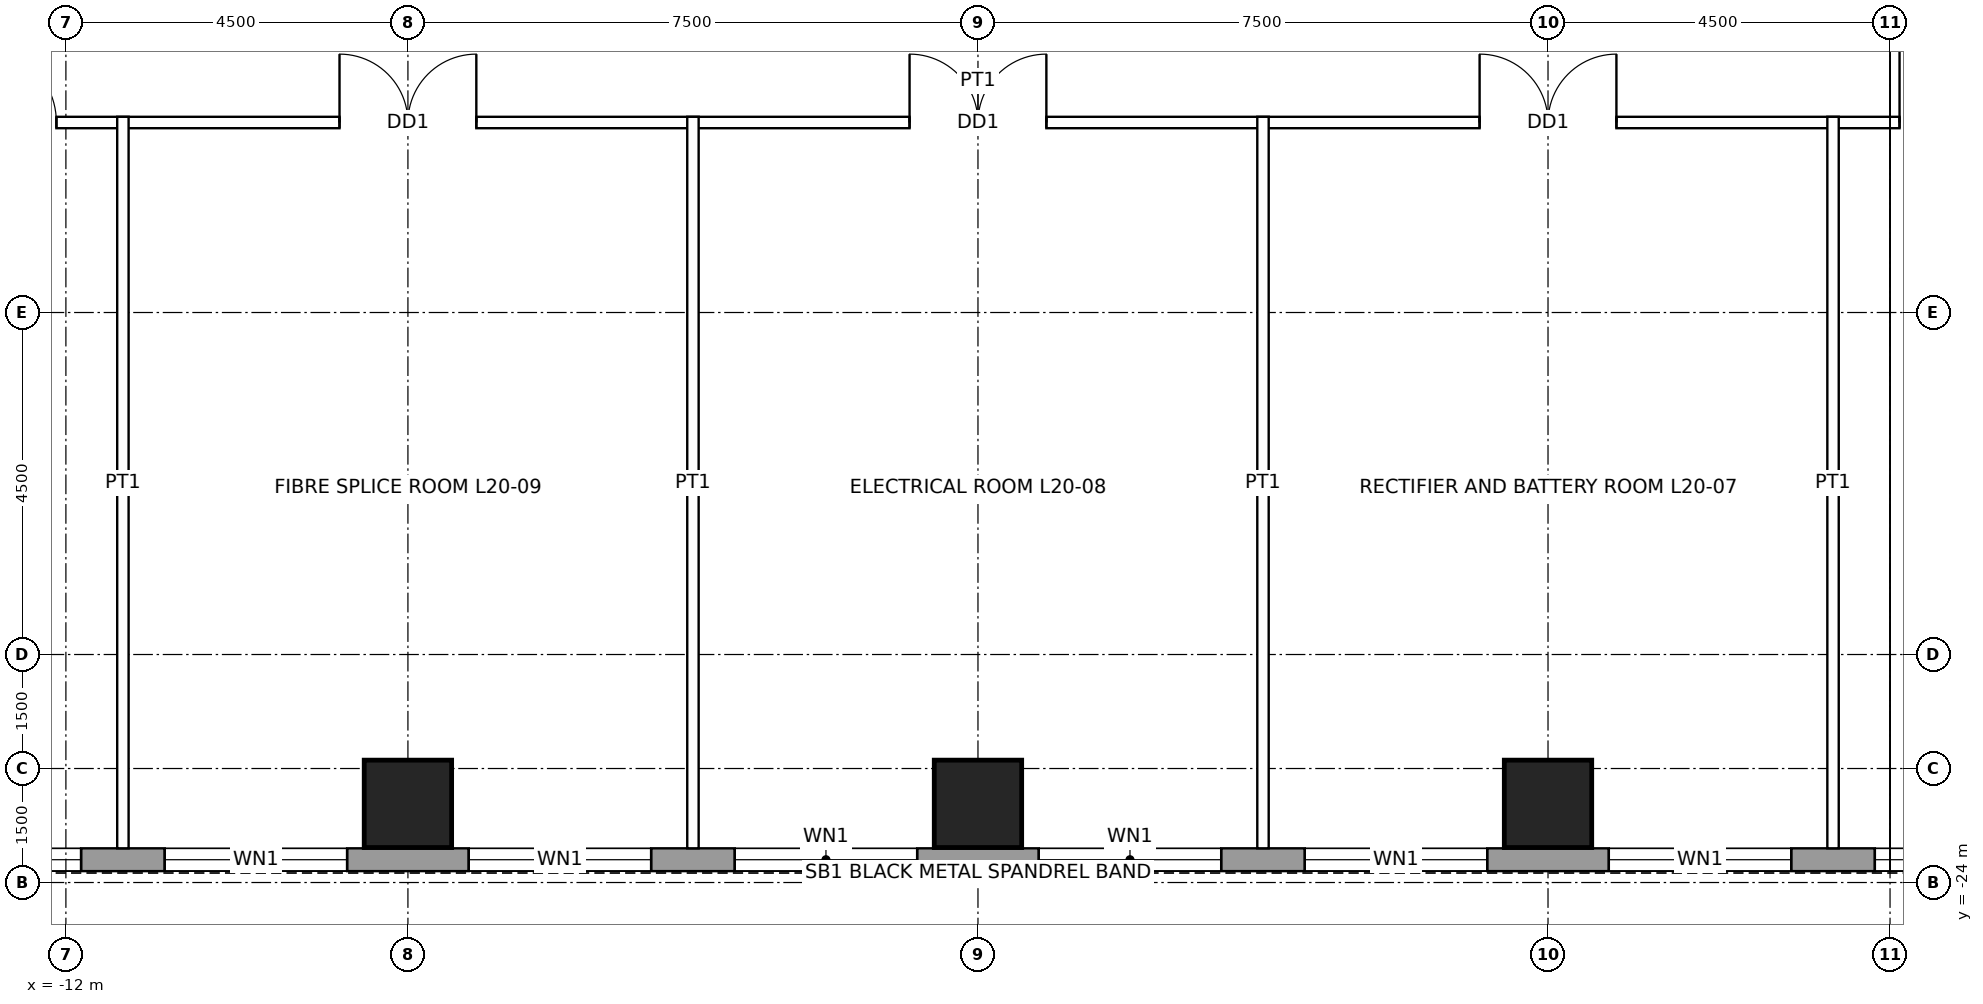
"""IFC4 building model, lengths in metres.
Left out: names, types, materials, properties, quantities, classifications, styles, units other than length and angle.
Written with IfcOpenShell. Run it as: python <this file> out.ifc"""

import sys

from ifc_helpers import new_model, si_unit, direction, frame, frame_2d, origin, origin_2d, place, context, subcontext, project, spatial, rectangle, hollow_rectangle, extrude, element, fill, save


model = new_model("IFC4")
c1 = context("Model", 3, precision=1e-05, world=origin(), true_north=direction((0.0, 1.0)))
c2 = subcontext(c1, "Body", "Model", "MODEL_VIEW")
j1 = project(units=[si_unit("LENGTHUNIT", "METRE"), si_unit("PLANEANGLEUNIT", "RADIAN")], contexts=[c1])
p1 = place(None, origin())
s1 = spatial("IfcSite", under=j1, at=p1, CompositionType="ELEMENT")
p2 = place(p1, origin())
s2 = spatial("IfcBuilding", under=s1, at=p2, CompositionType="ELEMENT")
p3 = place(p2, frame((0.0, 0.0, 104.4)))
s3 = spatial("IfcBuildingStorey", under=s2, at=p3, CompositionType="ELEMENT", Elevation=104.4)
for number, where, z_axis, x_axis in (
    (1, (7.5, -22.965, 0.0), (0.0, 0.0, 1.0), (1.0, 0.0, 0.0)),
    (2, (0.0, -22.965, 0.0), (0.0, 0.0, 1.0), (1.0, 0.0, 0.0)),
    (3, (-7.5, -22.965, 0.0), (0.0, 0.0, 1.0), (1.0, 0.0, 0.0)),
):
    element("IfcColumn", number, at=place(p3, frame(where, z_axis=z_axis, x_axis=x_axis)), inside=s3, PredefinedType="COLUMN", context=c2, shape_type="SweptSolid", body=[
        extrude(hollow_rectangle(XDim=1.15, YDim=1.15, WallThickness=0.075, at=origin_2d()), origin(), (0.0, 0.0, 1.0), 4.5),
    ])
p4 = place(p3, frame((16.2, -23.7, 0.0), z_axis=(0.0, 0.0, 1.0), x_axis=(-1.0, 0.0, 0.0)))
e4 = element("IfcWall", 4, at=p4, inside=s3, PredefinedType="SOLIDWALL", context=c2, shape_type="SweptSolid", body=[
    extrude(rectangle(XDim=32.4, YDim=0.3, at=frame_2d((16.2, 0.0))), origin(), (0.0, 0.0, 1.0), 4.3),
])
p5 = place(p4, frame((2.0, 0.0, 1.0)))
e5 = element("IfcOpeningElement", 5, at=p5, cuts=e4, PredefinedType="OPENING", context=c2, shape_type="SweptSolid", body=[
    extrude(rectangle(XDim=2.4, YDim=1.2, at=frame_2d((1.2, 0.6))), frame((0.0, 0.16, 0.0), z_axis=(0.0, -1.0, 0.0), x_axis=(1.0, 0.0, 0.0)), (0.0, 0.0, 1.0), 0.32),
])
p6 = place(p4, frame((5.5, 0.0, 1.0)))
e6 = element("IfcOpeningElement", 6, at=p6, cuts=e4, PredefinedType="OPENING", context=c2, shape_type="SweptSolid", body=[
    extrude(rectangle(XDim=2.4, YDim=1.2, at=frame_2d((1.2, 0.6))), frame((0.0, 0.16, 0.0), z_axis=(0.0, -1.0, 0.0), x_axis=(1.0, 0.0, 0.0)), (0.0, 0.0, 1.0), 0.32),
])
p7 = place(p4, frame((9.5, 0.0, 1.0)))
e7 = element("IfcOpeningElement", 7, at=p7, cuts=e4, PredefinedType="OPENING", context=c2, shape_type="SweptSolid", body=[
    extrude(rectangle(XDim=2.4, YDim=1.2, at=frame_2d((1.2, 0.6))), frame((0.0, 0.16, 0.0), z_axis=(0.0, -1.0, 0.0), x_axis=(1.0, 0.0, 0.0)), (0.0, 0.0, 1.0), 0.32),
])
p8 = place(p4, frame((13.0, 0.0, 1.0)))
e8 = element("IfcOpeningElement", 8, at=p8, cuts=e4, PredefinedType="OPENING", context=c2, shape_type="SweptSolid", body=[
    extrude(rectangle(XDim=2.4, YDim=1.2, at=frame_2d((1.2, 0.6))), frame((0.0, 0.16, 0.0), z_axis=(0.0, -1.0, 0.0), x_axis=(1.0, 0.0, 0.0)), (0.0, 0.0, 1.0), 0.32),
])
p9 = place(p4, frame((17.0, 0.0, 1.0)))
e9 = element("IfcOpeningElement", 9, at=p9, cuts=e4, PredefinedType="OPENING", context=c2, shape_type="SweptSolid", body=[
    extrude(rectangle(XDim=2.4, YDim=1.2, at=frame_2d((1.2, 0.6))), frame((0.0, 0.16, 0.0), z_axis=(0.0, -1.0, 0.0), x_axis=(1.0, 0.0, 0.0)), (0.0, 0.0, 1.0), 0.32),
])
p10 = place(p4, frame((20.5, 0.0, 1.0)))
e10 = element("IfcOpeningElement", 10, at=p10, cuts=e4, PredefinedType="OPENING", context=c2, shape_type="SweptSolid", body=[
    extrude(rectangle(XDim=2.4, YDim=1.2, at=frame_2d((1.2, 0.6))), frame((0.0, 0.16, 0.0), z_axis=(0.0, -1.0, 0.0), x_axis=(1.0, 0.0, 0.0)), (0.0, 0.0, 1.0), 0.32),
])
p11 = place(p4, frame((24.5, 0.0, 1.0)))
e11 = element("IfcOpeningElement", 11, at=p11, cuts=e4, PredefinedType="OPENING", context=c2, shape_type="SweptSolid", body=[
    extrude(rectangle(XDim=2.4, YDim=1.2, at=frame_2d((1.2, 0.6))), frame((0.0, 0.16, 0.0), z_axis=(0.0, -1.0, 0.0), x_axis=(1.0, 0.0, 0.0)), (0.0, 0.0, 1.0), 0.32),
])
p12 = place(p4, frame((28.0, 0.0, 1.0)))
e12 = element("IfcOpeningElement", 12, at=p12, cuts=e4, PredefinedType="OPENING", context=c2, shape_type="SweptSolid", body=[
    extrude(rectangle(XDim=2.4, YDim=1.2, at=frame_2d((1.2, 0.6))), frame((0.0, 0.16, 0.0), z_axis=(0.0, -1.0, 0.0), x_axis=(1.0, 0.0, 0.0)), (0.0, 0.0, 1.0), 0.32),
])
p13 = place(p3, frame((-14.075, -14.0, 0.0), z_axis=(0.0, 0.0, 1.0), x_axis=(1.0, 0.0, 0.0)))
e13 = element("IfcWall", 13, at=p13, inside=s3, PredefinedType="PARTITIONING", context=c2, shape_type="SweptSolid", body=[
    extrude(rectangle(XDim=28.15, YDim=0.15, at=frame_2d((14.075, 0.0))), origin(), (0.0, 0.0, 1.0), 4.3),
])
p14 = place(p13, frame((20.675, 0.0, 0.0)))
e14 = element("IfcOpeningElement", 14, at=p14, cuts=e13, PredefinedType="OPENING", context=c2, shape_type="SweptSolid", body=[
    extrude(rectangle(XDim=1.8, YDim=2.4, at=frame_2d((0.9, 1.2))), frame((0.0, 0.085, 0.0), z_axis=(0.0, -1.0, 0.0), x_axis=(1.0, 0.0, 0.0)), (0.0, 0.0, 1.0), 0.17),
])
p15 = place(p13, frame((13.175, 0.0, 0.0)))
e15 = element("IfcOpeningElement", 15, at=p15, cuts=e13, PredefinedType="OPENING", context=c2, shape_type="SweptSolid", body=[
    extrude(rectangle(XDim=1.8, YDim=2.4, at=frame_2d((0.9, 1.2))), frame((0.0, 0.085, 0.0), z_axis=(0.0, -1.0, 0.0), x_axis=(1.0, 0.0, 0.0)), (0.0, 0.0, 1.0), 0.17),
])
p16 = place(p13, frame((5.675, 0.0, 0.0)))
e16 = element("IfcOpeningElement", 16, at=p16, cuts=e13, PredefinedType="OPENING", context=c2, shape_type="SweptSolid", body=[
    extrude(rectangle(XDim=1.8, YDim=2.4, at=frame_2d((0.9, 1.2))), frame((0.0, 0.085, 0.0), z_axis=(0.0, -1.0, 0.0), x_axis=(1.0, 0.0, 0.0)), (0.0, 0.0, 1.0), 0.17),
])
p17 = place(p13, frame((26.2, 0.0, 0.0)))
e17 = element("IfcOpeningElement", 17, at=p17, cuts=e13, PredefinedType="OPENING", context=c2, shape_type="SweptSolid", body=[
    extrude(rectangle(XDim=1.0, YDim=2.1, at=frame_2d((0.5, 1.05))), frame((0.0, 0.085, 0.0), z_axis=(0.0, -1.0, 0.0), x_axis=(1.0, 0.0, 0.0)), (0.0, 0.0, 1.0), 0.17),
])
p18 = place(p13, frame((0.95, 0.0, 0.0)))
e18 = element("IfcOpeningElement", 18, at=p18, cuts=e13, PredefinedType="OPENING", context=c2, shape_type="SweptSolid", body=[
    extrude(rectangle(XDim=1.0, YDim=2.1, at=frame_2d((0.5, 1.05))), frame((0.0, 0.085, 0.0), z_axis=(0.0, -1.0, 0.0), x_axis=(1.0, 0.0, 0.0)), (0.0, 0.0, 1.0), 0.17),
])
for number, where, z_axis, x_axis in (
    (19, (-11.25, -23.55, 0.0), (0.0, 0.0, 1.0), (0.0, 1.0, 0.0)),
    (20, (-3.75, -23.55, 0.0), (0.0, 0.0, 1.0), (0.0, 1.0, 0.0)),
    (21, (3.75, -23.55, 0.0), (0.0, 0.0, 1.0), (0.0, 1.0, 0.0)),
    (22, (11.25, -23.55, 0.0), (0.0, 0.0, 1.0), (0.0, 1.0, 0.0)),
):
    element("IfcWall", number, at=place(p3, frame(where, z_axis=z_axis, x_axis=x_axis)), inside=s3, PredefinedType="PARTITIONING", context=c2, shape_type="SweptSolid", body=[
        extrude(rectangle(XDim=9.625, YDim=0.15, at=frame_2d((4.812, 0.0))), origin(), (0.0, 0.0, 1.0), 3.431),
    ])
p19 = place(p5, origin())
e23 = element("IfcWindow", 23, at=p19, inside=s3, PartitioningType="SINGLE_PANEL", PredefinedType="WINDOW", context=c2, shape_type="SweptSolid", body=[
    extrude(rectangle(XDim=2.4, YDim=1.2, at=frame_2d((1.2, 0.6))), frame((0.0, 0.03, 0.0), z_axis=(0.0, -1.0, 0.0), x_axis=(1.0, 0.0, 0.0)), (0.0, 0.0, 1.0), 0.06),
])
fill(e5, e23)
p20 = place(p6, origin())
e24 = element("IfcWindow", 24, at=p20, inside=s3, PartitioningType="SINGLE_PANEL", PredefinedType="WINDOW", context=c2, shape_type="SweptSolid", body=[
    extrude(rectangle(XDim=2.4, YDim=1.2, at=frame_2d((1.2, 0.6))), frame((0.0, 0.03, 0.0), z_axis=(0.0, -1.0, 0.0), x_axis=(1.0, 0.0, 0.0)), (0.0, 0.0, 1.0), 0.06),
])
fill(e6, e24)
p21 = place(p7, origin())
e25 = element("IfcWindow", 25, at=p21, inside=s3, PartitioningType="SINGLE_PANEL", PredefinedType="WINDOW", context=c2, shape_type="SweptSolid", body=[
    extrude(rectangle(XDim=2.4, YDim=1.2, at=frame_2d((1.2, 0.6))), frame((0.0, 0.03, 0.0), z_axis=(0.0, -1.0, 0.0), x_axis=(1.0, 0.0, 0.0)), (0.0, 0.0, 1.0), 0.06),
])
fill(e7, e25)
p22 = place(p8, origin())
e26 = element("IfcWindow", 26, at=p22, inside=s3, PartitioningType="SINGLE_PANEL", PredefinedType="WINDOW", context=c2, shape_type="SweptSolid", body=[
    extrude(rectangle(XDim=2.4, YDim=1.2, at=frame_2d((1.2, 0.6))), frame((0.0, 0.03, 0.0), z_axis=(0.0, -1.0, 0.0), x_axis=(1.0, 0.0, 0.0)), (0.0, 0.0, 1.0), 0.06),
])
fill(e8, e26)
p23 = place(p9, origin())
e27 = element("IfcWindow", 27, at=p23, inside=s3, PartitioningType="SINGLE_PANEL", PredefinedType="WINDOW", context=c2, shape_type="SweptSolid", body=[
    extrude(rectangle(XDim=2.4, YDim=1.2, at=frame_2d((1.2, 0.6))), frame((0.0, 0.03, 0.0), z_axis=(0.0, -1.0, 0.0), x_axis=(1.0, 0.0, 0.0)), (0.0, 0.0, 1.0), 0.06),
])
fill(e9, e27)
p24 = place(p10, origin())
e28 = element("IfcWindow", 28, at=p24, inside=s3, PartitioningType="SINGLE_PANEL", PredefinedType="WINDOW", context=c2, shape_type="SweptSolid", body=[
    extrude(rectangle(XDim=2.4, YDim=1.2, at=frame_2d((1.2, 0.6))), frame((0.0, 0.03, 0.0), z_axis=(0.0, -1.0, 0.0), x_axis=(1.0, 0.0, 0.0)), (0.0, 0.0, 1.0), 0.06),
])
fill(e10, e28)
p25 = place(p11, origin())
e29 = element("IfcWindow", 29, at=p25, inside=s3, PartitioningType="SINGLE_PANEL", PredefinedType="WINDOW", context=c2, shape_type="SweptSolid", body=[
    extrude(rectangle(XDim=2.4, YDim=1.2, at=frame_2d((1.2, 0.6))), frame((0.0, 0.03, 0.0), z_axis=(0.0, -1.0, 0.0), x_axis=(1.0, 0.0, 0.0)), (0.0, 0.0, 1.0), 0.06),
])
fill(e11, e29)
p26 = place(p12, origin())
e30 = element("IfcWindow", 30, at=p26, inside=s3, PartitioningType="SINGLE_PANEL", PredefinedType="WINDOW", context=c2, shape_type="SweptSolid", body=[
    extrude(rectangle(XDim=2.4, YDim=1.2, at=frame_2d((1.2, 0.6))), frame((0.0, 0.03, 0.0), z_axis=(0.0, -1.0, 0.0), x_axis=(1.0, 0.0, 0.0)), (0.0, 0.0, 1.0), 0.06),
])
fill(e12, e30)
p27 = place(p14, origin())
e31 = element("IfcDoor", 31, at=p27, inside=s3, OperationType="DOUBLE_DOOR_SINGLE_SWING", PredefinedType="DOOR", context=c2, shape_type="SweptSolid", body=[
    extrude(rectangle(XDim=1.8, YDim=2.4, at=frame_2d((0.9, 1.2))), frame((0.0, 0.025, 0.0), z_axis=(0.0, -1.0, 0.0), x_axis=(1.0, 0.0, 0.0)), (0.0, 0.0, 1.0), 0.05),
])
fill(e14, e31)
p28 = place(p15, origin())
e32 = element("IfcDoor", 32, at=p28, inside=s3, OperationType="DOUBLE_DOOR_SINGLE_SWING", PredefinedType="DOOR", context=c2, shape_type="SweptSolid", body=[
    extrude(rectangle(XDim=1.8, YDim=2.4, at=frame_2d((0.9, 1.2))), frame((0.0, 0.025, 0.0), z_axis=(0.0, -1.0, 0.0), x_axis=(1.0, 0.0, 0.0)), (0.0, 0.0, 1.0), 0.05),
])
fill(e15, e32)
p29 = place(p16, origin())
e33 = element("IfcDoor", 33, at=p29, inside=s3, OperationType="DOUBLE_DOOR_SINGLE_SWING", PredefinedType="DOOR", context=c2, shape_type="SweptSolid", body=[
    extrude(rectangle(XDim=1.8, YDim=2.4, at=frame_2d((0.9, 1.2))), frame((0.0, 0.025, 0.0), z_axis=(0.0, -1.0, 0.0), x_axis=(1.0, 0.0, 0.0)), (0.0, 0.0, 1.0), 0.05),
])
fill(e16, e33)
p30 = place(p17, origin())
e34 = element("IfcDoor", 34, at=p30, inside=s3, OperationType="SINGLE_SWING_LEFT", PredefinedType="DOOR", context=c2, shape_type="SweptSolid", body=[
    extrude(rectangle(XDim=1.0, YDim=2.1, at=frame_2d((0.5, 1.05))), frame((0.0, 0.025, 0.0), z_axis=(0.0, -1.0, 0.0), x_axis=(1.0, 0.0, 0.0)), (0.0, 0.0, 1.0), 0.05),
])
fill(e17, e34)
p31 = place(p18, origin())
e35 = element("IfcDoor", 35, at=p31, inside=s3, OperationType="SINGLE_SWING_LEFT", PredefinedType="DOOR", context=c2, shape_type="SweptSolid", body=[
    extrude(rectangle(XDim=1.0, YDim=2.1, at=frame_2d((0.5, 1.05))), frame((0.0, 0.025, 0.0), z_axis=(0.0, -1.0, 0.0), x_axis=(1.0, 0.0, 0.0)), (0.0, 0.0, 1.0), 0.05),
])
fill(e18, e35)
save(model, sys.argv[1])
